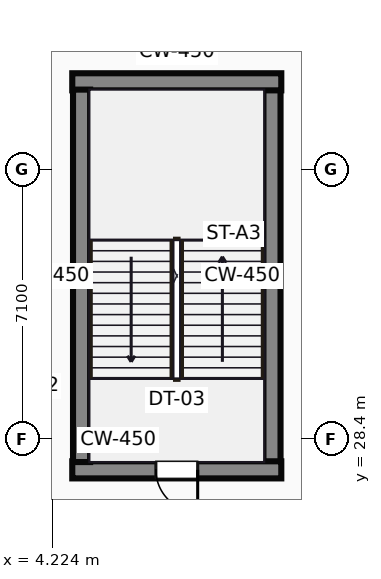
"""IFC4 building model, lengths in metres.
Left out: names, types, materials, properties, quantities, classifications, styles, units other than length and angle.
Written with IfcOpenShell. Run it as: python <this file> out.ifc"""

import sys

from ifc_helpers import new_model, si_unit, direction, frame, frame_2d, origin, place, context, subcontext, project, spatial, rectangle, extrude, source, transform, mapped, element, fill, save


model = new_model("IFC4")
c1 = context("Model", 3, precision=1e-05, world=origin(), true_north=direction((0.0, 1.0)))
c2 = subcontext(c1, "Body", "Model", "MODEL_VIEW")
j1 = project(units=[si_unit("LENGTHUNIT", "METRE"), si_unit("PLANEANGLEUNIT", "RADIAN")], contexts=[c1])
p1 = place(None, origin())
s1 = spatial("IfcSite", under=j1, at=p1, CompositionType="ELEMENT")
p2 = place(p1, origin())
s2 = spatial("IfcBuilding", under=s1, at=p2, CompositionType="ELEMENT")
p3 = place(p2, frame((0.0, 0.0, 6.0)))
s3 = spatial("IfcBuildingStorey", under=s2, at=p3, CompositionType="ELEMENT", Elevation=6.0)
m1 = source(origin(), c2, "Body", "SweptSolid", [
    extrude(rectangle(XDim=5.5, YDim=0.45, at=frame_2d((2.75, 0.0))), origin(), (0.0, 0.0, 1.0), 5.0),
])
p4 = place(p3, frame((4.75, 27.595, 0.0), z_axis=(0.0, 0.0, 1.0), x_axis=(1.0, 0.0, 0.0)))
e1 = element("IfcWall", 1, at=p4, inside=s3, PredefinedType="SHEAR", context=c2, shape_type="MappedRepresentation", body=[
    mapped(m1, transform((0.0, 0.0, 0.0))),
])
p5 = place(p4, frame((2.2, 0.0, 0.0)))
e2 = element("IfcOpeningElement", 2, at=p5, cuts=e1, PredefinedType="OPENING", context=c2, shape_type="SweptSolid", body=[
    extrude(rectangle(XDim=1.1, YDim=2.15, at=frame_2d((0.55, 1.075))), frame((0.0, 0.235, 0.0), z_axis=(0.0, -1.0, 0.0), x_axis=(1.0, 0.0, 0.0)), (0.0, 0.0, 1.0), 0.47),
])
m2 = source(origin(), c2, "Body", "SweptSolid", [
    extrude(rectangle(XDim=9.8, YDim=0.45, at=frame_2d((4.9, 0.0))), origin(), (0.0, 0.0, 1.0), 5.0),
])
for number, where, z_axis, x_axis in (
    (3, (4.995, 27.8, 0.0), (0.0, 0.0, 1.0), (0.0, 1.0, 0.0)),
    (4, (10.005, 27.8, 0.0), (0.0, 0.0, 1.0), (0.0, 1.0, 0.0)),
):
    element("IfcWall", number, at=place(p3, frame(where, z_axis=z_axis, x_axis=x_axis)), inside=s3, PredefinedType="SHEAR", context=c2, shape_type="MappedRepresentation", body=[
        mapped(m2, transform((0.0, 0.0, 0.0))),
    ])
p6 = place(p3, frame((4.75, 37.805, 0.0), z_axis=(0.0, 0.0, 1.0), x_axis=(1.0, 0.0, 0.0)))
e5 = element("IfcWall", 5, at=p6, inside=s3, PredefinedType="SHEAR", context=c2, shape_type="MappedRepresentation", body=[
    mapped(m1, transform((0.0, 0.0, 0.0))),
])
m3 = source(origin(), c2, "Body", "SweptSolid", [
    extrude(rectangle(XDim=1.1, YDim=2.15, at=frame_2d((0.55, 1.075))), frame((0.0, 0.025, 0.0), z_axis=(0.0, -1.0, 0.0), x_axis=(1.0, 0.0, 0.0)), (0.0, 0.0, 1.0), 0.05),
])
p7 = place(p5, origin())
e6 = element("IfcDoor", 6, at=p7, inside=s3, OperationType="SINGLE_SWING_RIGHT", PredefinedType="DOOR", context=c2, shape_type="MappedRepresentation", body=[
    mapped(m3, transform((0.0, 0.0, 0.0))),
])
fill(e2, e6)
save(model, sys.argv[1])
